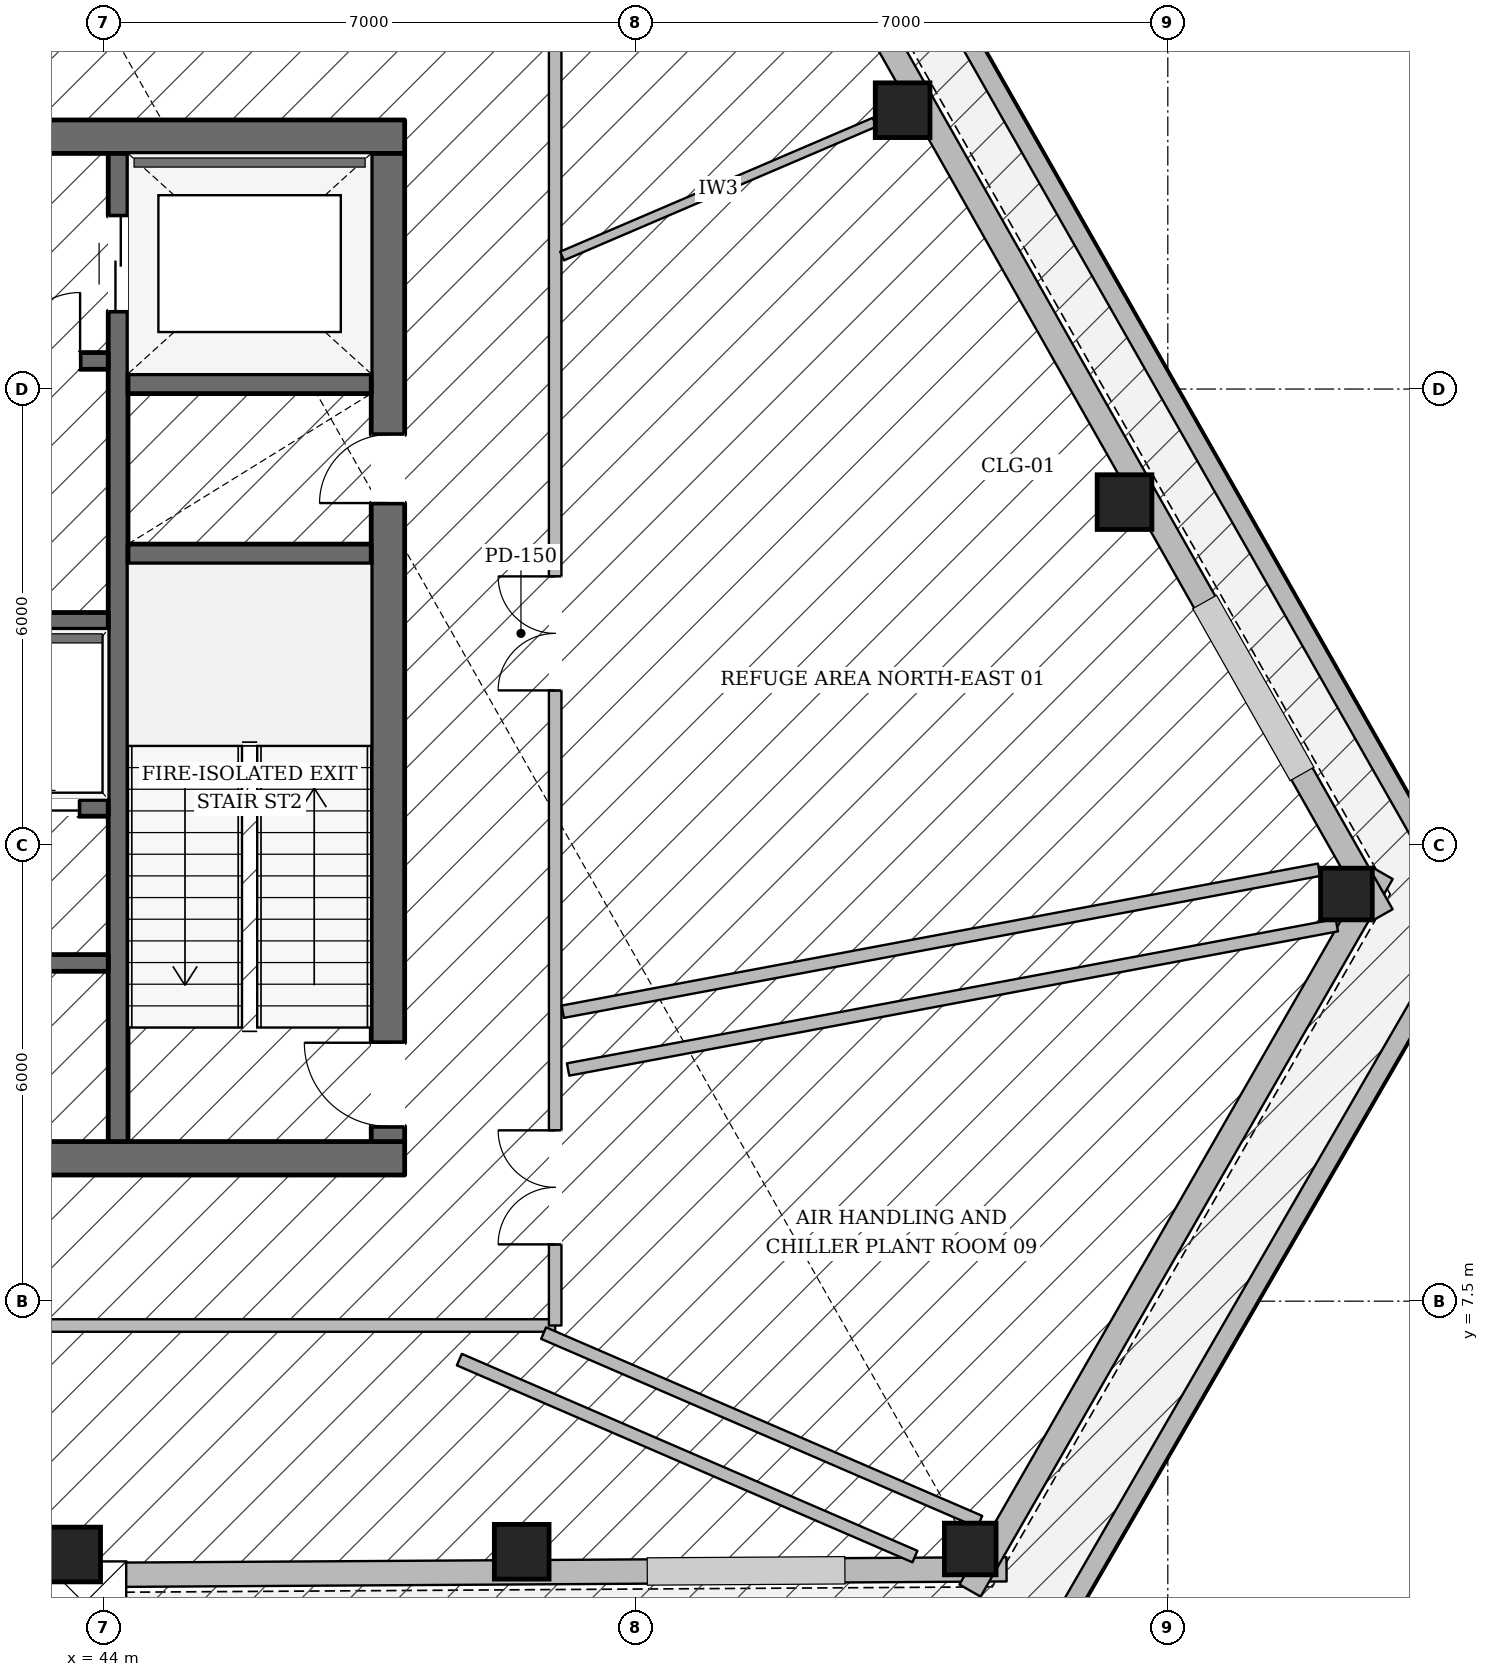
"""IFC4 building model, lengths in metres.
Left out: names, types, materials, properties, quantities, classifications, styles, units other than length and angle.
Written with IfcOpenShell. Run it as: python <this file> out.ifc"""

import sys

from ifc_helpers import new_model, si_unit, direction, frame, frame_2d, origin, origin_2d, place, context, subcontext, project, spatial, rectangle, hollow_rectangle, extrude, element, fill, save


model = new_model("IFC4")
c1 = context("Model", 3, precision=1e-05, world=origin(), true_north=direction((0.0, 1.0)))
c2 = subcontext(c1, "Body", "Model", "MODEL_VIEW")
j1 = project(units=[si_unit("LENGTHUNIT", "METRE"), si_unit("PLANEANGLEUNIT", "RADIAN")], contexts=[c1])
p1 = place(None, origin())
s1 = spatial("IfcSite", under=j1, at=p1, CompositionType="ELEMENT")
p2 = place(p1, origin())
s2 = spatial("IfcBuilding", under=s1, at=p2, CompositionType="ELEMENT")
p3 = place(p2, frame((0.0, 0.0, 154.8)))
s3 = spatial("IfcBuildingStorey", under=s2, at=p3, CompositionType="ELEMENT", Elevation=154.8)
p4 = place(p3, frame((28.04, 9.38, 0.0), z_axis=(0.0, 0.0, 1.0), x_axis=(1.0, 0.0, 0.0)))
e1 = element("IfcWall", 1, at=p4, inside=s3, PredefinedType="SOLIDWALL", context=c2, shape_type="SweptSolid", body=[
    extrude(rectangle(XDim=19.92, YDim=0.44, at=frame_2d((9.96, 0.0))), origin(), (0.0, 0.0, 1.0), 4.985),
])
p5 = place(p4, frame((10.46, 0.0, 0.0)))
e2 = element("IfcOpeningElement", 2, at=p5, cuts=e1, PredefinedType="OPENING", context=c2, shape_type="SweptSolid", body=[
    extrude(rectangle(XDim=1.4, YDim=2.2, at=frame_2d((0.7, 1.1))), frame((0.0, 0.23, 0.0), z_axis=(0.0, -1.0, 0.0), x_axis=(1.0, 0.0, 0.0)), (0.0, 0.0, 1.0), 0.46),
])
p6 = place(p3, frame((28.04, 22.82, 0.0), z_axis=(0.0, 0.0, 1.0), x_axis=(1.0, 0.0, 0.0)))
e3 = element("IfcWall", 3, at=p6, inside=s3, PredefinedType="SOLIDWALL", context=c2, shape_type="SweptSolid", body=[
    extrude(rectangle(XDim=19.92, YDim=0.44, at=frame_2d((9.96, 0.0))), origin(), (0.0, 0.0, 1.0), 4.985),
])
p7 = place(p6, frame((6.235, 0.0, 0.0)))
e4 = element("IfcOpeningElement", 4, at=p7, cuts=e3, PredefinedType="OPENING", context=c2, shape_type="SweptSolid", body=[
    extrude(rectangle(XDim=1.05, YDim=2.15, at=frame_2d((0.525, 1.075))), frame((0.0, 0.23, 0.0), z_axis=(0.0, -1.0, 0.0), x_axis=(1.0, 0.0, 0.0)), (0.0, 0.0, 1.0), 0.46),
])
p8 = place(p6, frame((12.635, 0.0, 0.0)))
e5 = element("IfcOpeningElement", 5, at=p8, cuts=e3, PredefinedType="OPENING", context=c2, shape_type="SweptSolid", body=[
    extrude(rectangle(XDim=1.05, YDim=2.15, at=frame_2d((0.525, 1.075))), frame((0.0, 0.23, 0.0), z_axis=(0.0, -1.0, 0.0), x_axis=(1.0, 0.0, 0.0)), (0.0, 0.0, 1.0), 0.46),
])
p9 = place(p3, frame((47.74, 9.6, 0.0), z_axis=(0.0, 0.0, 1.0), x_axis=(0.0, 1.0, 0.0)))
e6 = element("IfcWall", 6, at=p9, inside=s3, PredefinedType="SOLIDWALL", context=c2, shape_type="SweptSolid", body=[
    extrude(rectangle(XDim=13.0, YDim=0.44, at=frame_2d((6.5, 0.0))), origin(), (0.0, 0.0, 1.0), 4.985),
])
p10 = place(p9, frame((0.2, 0.0, 0.0)))
e7 = element("IfcOpeningElement", 7, at=p10, cuts=e6, PredefinedType="OPENING", context=c2, shape_type="SweptSolid", body=[
    extrude(rectangle(XDim=1.1, YDim=2.15, at=frame_2d((0.55, 1.075))), frame((0.0, 0.23, 0.0), z_axis=(0.0, -1.0, 0.0), x_axis=(1.0, 0.0, 0.0)), (0.0, 0.0, 1.0), 0.46),
])
p11 = place(p9, frame((8.4, 0.0, 0.0)))
e8 = element("IfcOpeningElement", 8, at=p11, cuts=e6, PredefinedType="OPENING", context=c2, shape_type="SweptSolid", body=[
    extrude(rectangle(XDim=0.9, YDim=2.1, at=frame_2d((0.45, 1.05))), frame((0.0, 0.23, 0.0), z_axis=(0.0, -1.0, 0.0), x_axis=(1.0, 0.0, 0.0)), (0.0, 0.0, 1.0), 0.46),
])
p12 = place(p3, frame((44.19, 9.6, 0.0), z_axis=(0.0, 0.0, 1.0), x_axis=(0.0, 1.0, 0.0)))
e9 = element("IfcWall", 9, at=p12, inside=s3, PredefinedType="SHEAR", context=c2, shape_type="SweptSolid", body=[
    extrude(rectangle(XDim=13.0, YDim=0.26, at=frame_2d((6.5, 0.0))), origin(), (0.0, 0.0, 1.0), 4.985),
])
p13 = place(p12, frame((10.925, 0.0, 0.0)))
e10 = element("IfcOpeningElement", 10, at=p13, cuts=e9, PredefinedType="OPENING", context=c2, shape_type="SweptSolid", body=[
    extrude(rectangle(XDim=1.25, YDim=2.25, at=frame_2d((0.625, 1.125))), frame((0.0, 0.14, 0.0), z_axis=(0.0, -1.0, 0.0), x_axis=(1.0, 0.0, 0.0)), (0.0, 0.0, 1.0), 0.28),
])
for number, where, z_axis, x_axis in (
    (11, (44.32, 17.33, 0.0), (0.0, 0.0, 1.0), (1.0, 0.0, 0.0)),
    (12, (44.32, 19.57, 0.0), (0.0, 0.0, 1.0), (1.0, 0.0, 0.0)),
):
    element("IfcWall", number, at=place(p3, frame(where, z_axis=z_axis, x_axis=x_axis)), inside=s3, PredefinedType="SHEAR", context=c2, shape_type="SweptSolid", body=[
        extrude(rectangle(XDim=3.2, YDim=0.26, at=frame_2d((1.6, 0.0))), origin(), (0.0, 0.0, 1.0), 4.985),
    ])
p14 = place(p3, frame((31.94, 19.87, 0.0), z_axis=(0.0, 0.0, 1.0), x_axis=(1.0, 0.0, 0.0)))
e13 = element("IfcWall", 13, at=p14, inside=s3, PredefinedType="SOLIDWALL", context=c2, shape_type="SweptSolid", body=[
    extrude(rectangle(XDim=12.12, YDim=0.22, at=frame_2d((6.06, 0.0))), origin(), (0.0, 0.0, 1.0), 4.985),
])
p15 = place(p14, frame((6.3, 0.0, 0.0)))
e14 = element("IfcOpeningElement", 14, at=p15, cuts=e13, PredefinedType="OPENING", context=c2, shape_type="SweptSolid", body=[
    extrude(rectangle(XDim=1.1, YDim=2.15, at=frame_2d((0.55, 1.075))), frame((0.0, 0.12, 0.0), z_axis=(0.0, -1.0, 0.0), x_axis=(1.0, 0.0, 0.0)), (0.0, 0.0, 1.0), 0.24),
])
p16 = place(p14, frame((8.61, 0.0, 0.0)))
e15 = element("IfcOpeningElement", 15, at=p16, cuts=e13, PredefinedType="OPENING", context=c2, shape_type="SweptSolid", body=[
    extrude(rectangle(XDim=0.9, YDim=2.1, at=frame_2d((0.45, 1.05))), frame((0.0, 0.12, 0.0), z_axis=(0.0, -1.0, 0.0), x_axis=(1.0, 0.0, 0.0)), (0.0, 0.0, 1.0), 0.24),
])
p17 = place(p14, frame((10.85, 0.0, 0.0)))
e16 = element("IfcOpeningElement", 16, at=p17, cuts=e13, PredefinedType="OPENING", context=c2, shape_type="SweptSolid", body=[
    extrude(rectangle(XDim=0.9, YDim=2.1, at=frame_2d((0.45, 1.05))), frame((0.0, 0.12, 0.0), z_axis=(0.0, -1.0, 0.0), x_axis=(1.0, 0.0, 0.0)), (0.0, 0.0, 1.0), 0.24),
])
p18 = place(p3, frame((31.94, 16.45, 0.0), z_axis=(0.0, 0.0, 1.0), x_axis=(1.0, 0.0, 0.0)))
e17 = element("IfcWall", 17, at=p18, inside=s3, PredefinedType="SOLIDWALL", context=c2, shape_type="SweptSolid", body=[
    extrude(rectangle(XDim=12.12, YDim=0.22, at=frame_2d((6.06, 0.0))), origin(), (0.0, 0.0, 1.0), 4.985),
])
p19 = place(p3, frame((31.94, 13.99, 0.0), z_axis=(0.0, 0.0, 1.0), x_axis=(1.0, 0.0, 0.0)))
e18 = element("IfcWall", 18, at=p19, inside=s3, PredefinedType="SOLIDWALL", context=c2, shape_type="SweptSolid", body=[
    extrude(rectangle(XDim=12.12, YDim=0.22, at=frame_2d((6.06, 0.0))), origin(), (0.0, 0.0, 1.0), 4.985),
])
p20 = place(p19, frame((1.21, 0.0, 0.0)))
e19 = element("IfcOpeningElement", 19, at=p20, cuts=e18, PredefinedType="OPENING", context=c2, shape_type="SweptSolid", body=[
    extrude(rectangle(XDim=0.9, YDim=2.1, at=frame_2d((0.45, 1.05))), frame((0.0, 0.12, 0.0), z_axis=(0.0, -1.0, 0.0), x_axis=(1.0, 0.0, 0.0)), (0.0, 0.0, 1.0), 0.24),
])
p21 = place(p19, frame((4.31, 0.0, 0.0)))
e20 = element("IfcOpeningElement", 20, at=p21, cuts=e18, PredefinedType="OPENING", context=c2, shape_type="SweptSolid", body=[
    extrude(rectangle(XDim=0.9, YDim=2.1, at=frame_2d((0.45, 1.05))), frame((0.0, 0.12, 0.0), z_axis=(0.0, -1.0, 0.0), x_axis=(1.0, 0.0, 0.0)), (0.0, 0.0, 1.0), 0.24),
])
p22 = place(p19, frame((6.535, 0.0, 0.0)))
e21 = element("IfcOpeningElement", 21, at=p22, cuts=e18, PredefinedType="OPENING", context=c2, shape_type="SweptSolid", body=[
    extrude(rectangle(XDim=1.1, YDim=2.2, at=frame_2d((0.55, 1.1))), frame((0.0, 0.12, 0.0), z_axis=(0.0, -1.0, 0.0), x_axis=(1.0, 0.0, 0.0)), (0.0, 0.0, 1.0), 0.24),
])
p23 = place(p19, frame((8.585, 0.0, 0.0)))
e22 = element("IfcOpeningElement", 22, at=p23, cuts=e18, PredefinedType="OPENING", context=c2, shape_type="SweptSolid", body=[
    extrude(rectangle(XDim=1.1, YDim=2.2, at=frame_2d((0.55, 1.1))), frame((0.0, 0.12, 0.0), z_axis=(0.0, -1.0, 0.0), x_axis=(1.0, 0.0, 0.0)), (0.0, 0.0, 1.0), 0.24),
])
p24 = place(p19, frame((10.635, 0.0, 0.0)))
e23 = element("IfcOpeningElement", 23, at=p24, cuts=e18, PredefinedType="OPENING", context=c2, shape_type="SweptSolid", body=[
    extrude(rectangle(XDim=1.1, YDim=2.2, at=frame_2d((0.55, 1.1))), frame((0.0, 0.12, 0.0), z_axis=(0.0, -1.0, 0.0), x_axis=(1.0, 0.0, 0.0)), (0.0, 0.0, 1.0), 0.24),
])
p25 = place(p3, frame((40.28, 11.95, 0.0), z_axis=(0.0, 0.0, 1.0), x_axis=(1.0, 0.0, 0.0)))
e24 = element("IfcWall", 24, at=p25, inside=s3, PredefinedType="SOLIDWALL", context=c2, shape_type="SweptSolid", body=[
    extrude(rectangle(XDim=3.78, YDim=0.22, at=frame_2d((1.89, 0.0))), origin(), (0.0, 0.0, 1.0), 4.985),
])
p26 = place(p25, frame((1.55, 0.0, 0.0)))
e25 = element("IfcOpeningElement", 25, at=p26, cuts=e24, PredefinedType="OPENING", context=c2, shape_type="SweptSolid", body=[
    extrude(rectangle(XDim=0.9, YDim=2.1, at=frame_2d((0.45, 1.05))), frame((0.0, 0.12, 0.0), z_axis=(0.0, -1.0, 0.0), x_axis=(1.0, 0.0, 0.0)), (0.0, 0.0, 1.0), 0.24),
])
for number, where, z_axis, x_axis in (
    (26, (43.599, 4.167, 0.0), (0.0, 0.0, 1.0), (1.0, 0.0, 0.0)),
    (27, (49.5, 4.204, 0.0), (0.0, 0.0, 1.0), (1.0, 0.0, 0.0)),
):
    element("IfcColumn", number, at=place(p3, frame(where, z_axis=z_axis, x_axis=x_axis)), inside=s3, PredefinedType="COLUMN", context=c2, shape_type="SweptSolid", body=[
        extrude(hollow_rectangle(XDim=0.72, YDim=0.72, WallThickness=0.032, at=origin_2d()), origin(), (0.0, 0.0, 1.0), 4.985),
    ])
for number, where, z_axis, x_axis in (
    (28, (55.401, 4.24, 0.0), (0.0, 0.0, 1.0), (1.0, 0.0, 0.0)),
    (29, (60.35, 12.857, 0.0), (0.0, 0.0, 1.0), (1.0, 0.0, 0.0)),
):
    element("IfcColumn", number, at=place(p3, frame(where, z_axis=z_axis, x_axis=x_axis)), inside=s3, PredefinedType="COLUMN", context=c2, shape_type="SweptSolid", body=[
        extrude(hollow_rectangle(XDim=0.68, YDim=0.68, WallThickness=0.03, at=origin_2d()), origin(), (0.0, 0.0, 1.0), 4.985),
    ])
for number, where, z_axis, x_axis in (
    (30, (57.431, 18.012, 0.0), (0.0, 0.0, 1.0), (1.0, 0.0, 0.0)),
    (31, (54.511, 23.168, 0.0), (0.0, 0.0, 1.0), (1.0, 0.0, 0.0)),
):
    element("IfcColumn", number, at=place(p3, frame(where, z_axis=z_axis, x_axis=x_axis)), inside=s3, PredefinedType="COLUMN", context=c2, shape_type="SweptSolid", body=[
        extrude(hollow_rectangle(XDim=0.72, YDim=0.72, WallThickness=0.032, at=origin_2d()), origin(), (0.0, 0.0, 1.0), 4.985),
    ])
p27 = place(p3, frame((55.878, 3.973, 0.0), z_axis=(0.0, 0.0, 1.0), x_axis=(-0.999981007106, -0.006163231827, 0.0)))
e32 = element("IfcWall", 32, at=p27, inside=s3, PredefinedType="STANDARD", context=c2, shape_type="SweptSolid", body=[
    extrude(rectangle(XDim=36.364, YDim=0.32, at=frame_2d((18.182, 0.0))), origin(), (0.0, 0.0, 1.0), 3.677),
])
p28 = place(p3, frame((60.82, 13.133, 0.0), z_axis=(0.0, 0.0, 1.0), x_axis=(-0.498074593496, -0.867134187605, 0.0)))
e33 = element("IfcWall", 33, at=p28, inside=s3, PredefinedType="STANDARD", context=c2, shape_type="SweptSolid", body=[
    extrude(rectangle(XDim=10.887, YDim=0.32, at=frame_2d((5.443, 0.0))), origin(), (0.0, 0.0, 1.0), 3.677),
])
p29 = place(p3, frame((42.832, 44.344, 0.0), z_axis=(0.0, 0.0, 1.0), x_axis=(0.492716907926, -0.870189662455, 0.0)))
e34 = element("IfcWall", 34, at=p29, inside=s3, PredefinedType="STANDARD", context=c2, shape_type="SweptSolid", body=[
    extrude(rectangle(XDim=36.505, YDim=0.32, at=frame_2d((18.253, 0.0))), origin(), (0.0, 0.0, 1.0), 3.677),
])
p30 = place(p3, frame((56.338, 2.824, 0.0), z_axis=(0.0, 0.0, 1.0), x_axis=(0.500909529634, 0.865499649406, 0.0)))
e35 = element("IfcWall", 35, at=p30, inside=s3, PredefinedType="PARAPET", context=c2, shape_type="SweptSolid", body=[
    extrude(rectangle(XDim=11.39, YDim=0.24, at=frame_2d((5.695, 0.0))), origin(), (0.0, 0.0, 1.0), 1.25),
])
p31 = place(p3, frame((62.043, 12.37, 0.0), z_axis=(0.0, 0.0, 1.0), x_axis=(-0.494365638539, 0.869254056897, 0.0)))
e36 = element("IfcWall", 36, at=p31, inside=s3, PredefinedType="PARAPET", context=c2, shape_type="SweptSolid", body=[
    extrude(rectangle(XDim=37.934, YDim=0.24, at=frame_2d((18.967, 0.0))), origin(), (0.0, 0.0, 1.0), 1.25),
])
p32 = place(p3, frame((26.06, 7.18, 0.0), z_axis=(0.0, 0.0, 1.0), x_axis=(1.0, 0.0, 0.0)))
e37 = element("IfcWall", 37, at=p32, inside=s3, PredefinedType="PARTITIONING", context=c2, shape_type="SweptSolid", body=[
    extrude(rectangle(XDim=23.88, YDim=0.165, at=frame_2d((11.94, 0.0))), origin(), (0.0, 0.0, 1.0), 2.825),
])
p33 = place(p32, frame((3.682, 0.0, 0.0)))
e38 = element("IfcOpeningElement", 38, at=p33, cuts=e37, PredefinedType="OPENING", context=c2, shape_type="SweptSolid", body=[
    extrude(rectangle(XDim=1.5, YDim=2.25, at=frame_2d((0.75, 1.125))), frame((0.0, 0.093, 0.0), z_axis=(0.0, -1.0, 0.0), x_axis=(1.0, 0.0, 0.0)), (0.0, 0.0, 1.0), 0.185),
])
p34 = place(p32, frame((13.829, 0.0, 0.0)))
e39 = element("IfcOpeningElement", 39, at=p34, cuts=e37, PredefinedType="OPENING", context=c2, shape_type="SweptSolid", body=[
    extrude(rectangle(XDim=1.5, YDim=2.25, at=frame_2d((0.75, 1.125))), frame((0.0, 0.093, 0.0), z_axis=(0.0, -1.0, 0.0), x_axis=(1.0, 0.0, 0.0)), (0.0, 0.0, 1.0), 0.185),
])
p35 = place(p3, frame((49.94, 7.18, 0.0), z_axis=(0.0, 0.0, 1.0), x_axis=(0.0, 1.0, 0.0)))
e40 = element("IfcWall", 40, at=p35, inside=s3, PredefinedType="PARTITIONING", context=c2, shape_type="SweptSolid", body=[
    extrude(rectangle(XDim=17.84, YDim=0.165, at=frame_2d((8.92, 0.0))), origin(), (0.0, 0.0, 1.0), 4.673),
])
p36 = place(p35, frame((8.355, 0.0, 0.0)))
e41 = element("IfcOpeningElement", 41, at=p36, cuts=e40, PredefinedType="OPENING", context=c2, shape_type="SweptSolid", body=[
    extrude(rectangle(XDim=1.5, YDim=2.25, at=frame_2d((0.75, 1.125))), frame((0.0, 0.093, 0.0), z_axis=(0.0, -1.0, 0.0), x_axis=(1.0, 0.0, 0.0)), (0.0, 0.0, 1.0), 0.185),
])
p37 = place(p35, frame((1.067, 0.0, 0.0)))
e42 = element("IfcOpeningElement", 42, at=p37, cuts=e40, PredefinedType="OPENING", context=c2, shape_type="SweptSolid", body=[
    extrude(rectangle(XDim=1.5, YDim=2.25, at=frame_2d((0.75, 1.125))), frame((0.0, 0.093, 0.0), z_axis=(0.0, -1.0, 0.0), x_axis=(1.0, 0.0, 0.0)), (0.0, 0.0, 1.0), 0.185),
])
p38 = place(p3, frame((49.788, 7.08, 0.0), z_axis=(0.0, 0.0, 1.0), x_axis=(0.917914325814, -0.396778641645, 0.0)))
e43 = element("IfcWall", 43, at=p38, inside=s3, PredefinedType="PARTITIONING", context=c2, shape_type="SweptSolid", body=[
    extrude(rectangle(XDim=6.251, YDim=0.165, at=frame_2d((3.125, 0.0))), origin(), (0.0, 0.0, 1.0), 4.985),
])
p39 = place(p3, frame((48.679, 6.731, 0.0), z_axis=(0.0, 0.0, 1.0), x_axis=(0.917920342818, -0.396764721518, 0.0)))
e44 = element("IfcWall", 44, at=p39, inside=s3, PredefinedType="PARTITIONING", context=c2, shape_type="SweptSolid", body=[
    extrude(rectangle(XDim=6.53, YDim=0.165, at=frame_2d((3.265, 0.0))), origin(), (0.0, 0.0, 1.0), 3.68),
])
p40 = place(p3, frame((50.04, 11.308, 0.0), z_axis=(0.0, 0.0, 1.0), x_axis=(0.98283531121, 0.184485097062, 0.0)))
e45 = element("IfcWall", 45, at=p40, inside=s3, PredefinedType="PARTITIONING", context=c2, shape_type="SweptSolid", body=[
    extrude(rectangle(XDim=10.124, YDim=0.165, at=frame_2d((5.062, 0.0))), origin(), (0.0, 0.0, 1.0), 4.985),
])
p41 = place(p3, frame((50.11, 10.548, 0.0), z_axis=(0.0, 0.0, 1.0), x_axis=(0.982839403787, 0.184463292725, 0.0)))
e46 = element("IfcWall", 46, at=p41, inside=s3, PredefinedType="PARTITIONING", context=c2, shape_type="SweptSolid", body=[
    extrude(rectangle(XDim=10.29, YDim=0.165, at=frame_2d((5.145, 0.0))), origin(), (0.0, 0.0, 1.0), 4.673),
])
p42 = place(p3, frame((50.031, 21.25, 0.0), z_axis=(0.0, 0.0, 1.0), x_axis=(0.919317125759, 0.393517499338, 0.0)))
e47 = element("IfcWall", 47, at=p42, inside=s3, PredefinedType="PARTITIONING", context=c2, shape_type="SweptSolid", body=[
    extrude(rectangle(XDim=4.474, YDim=0.125, at=frame_2d((2.237, 0.0))), origin(), (0.0, 0.0, 1.0), 3.68),
])
p43 = place(p3, frame((0.0, 0.0, -0.22)))
p44 = place(p43, frame((43.747, 3.527, 0.0)))
p45 = place(p44, frame((0.0, 0.0, 0.17)))
e48 = element("IfcWindow", 48, at=p45, inside=s3, PartitioningType="SINGLE_PANEL", PredefinedType="SKYLIGHT", context=c2, shape_type="SweptSolid", body=[
    extrude(rectangle(XDim=1.1, YDim=1.1, at=origin_2d()), origin(), (0.0, 0.0, 1.0), 0.05),
])
p46 = place(p10, origin())
e49 = element("IfcDoor", 49, at=p46, inside=s3, OperationType="SINGLE_SWING_RIGHT", PredefinedType="DOOR", context=c2, shape_type="SweptSolid", body=[
    extrude(rectangle(XDim=1.1, YDim=2.15, at=frame_2d((0.55, 1.075))), frame((0.0, 0.025, 0.0), z_axis=(0.0, -1.0, 0.0), x_axis=(1.0, 0.0, 0.0)), (0.0, 0.0, 1.0), 0.05),
])
fill(e7, e49)
p47 = place(p11, origin())
e50 = element("IfcDoor", 50, at=p47, inside=s3, OperationType="SINGLE_SWING_LEFT", PredefinedType="DOOR", context=c2, shape_type="SweptSolid", body=[
    extrude(rectangle(XDim=0.9, YDim=2.1, at=frame_2d((0.45, 1.05))), frame((0.0, 0.025, 0.0), z_axis=(0.0, -1.0, 0.0), x_axis=(1.0, 0.0, 0.0)), (0.0, 0.0, 1.0), 0.05),
])
fill(e8, e50)
p48 = place(p13, origin())
e51 = element("IfcDoor", 51, at=p48, inside=s3, OperationType="DOUBLE_DOOR_SLIDING", PredefinedType="DOOR", context=c2, shape_type="SweptSolid", body=[
    extrude(rectangle(XDim=1.25, YDim=2.25, at=frame_2d((0.625, 1.125))), frame((0.0, 0.025, 0.0), z_axis=(0.0, -1.0, 0.0), x_axis=(1.0, 0.0, 0.0)), (0.0, 0.0, 1.0), 0.05),
])
fill(e10, e51)
p49 = place(p24, origin())
e52 = element("IfcDoor", 52, at=p49, inside=s3, OperationType="DOUBLE_DOOR_SLIDING", PredefinedType="DOOR", context=c2, shape_type="SweptSolid", body=[
    extrude(rectangle(XDim=1.1, YDim=2.2, at=frame_2d((0.55, 1.1))), frame((0.0, 0.025, 0.0), z_axis=(0.0, -1.0, 0.0), x_axis=(1.0, 0.0, 0.0)), (0.0, 0.0, 1.0), 0.05),
])
fill(e23, e52)
p50 = place(p17, origin())
e53 = element("IfcDoor", 53, at=p50, inside=s3, OperationType="SINGLE_SWING_RIGHT", PredefinedType="DOOR", context=c2, shape_type="SweptSolid", body=[
    extrude(rectangle(XDim=0.9, YDim=2.1, at=frame_2d((0.45, 1.05))), frame((0.0, 0.025, 0.0), z_axis=(0.0, -1.0, 0.0), x_axis=(1.0, 0.0, 0.0)), (0.0, 0.0, 1.0), 0.05),
])
fill(e16, e53)
p51 = place(p36, origin())
e54 = element("IfcDoor", 54, at=p51, inside=s3, OperationType="DOUBLE_DOOR_SINGLE_SWING", PredefinedType="DOOR", context=c2, shape_type="SweptSolid", body=[
    extrude(rectangle(XDim=1.5, YDim=2.25, at=frame_2d((0.75, 1.125))), frame((0.0, 0.025, 0.0), z_axis=(0.0, -1.0, 0.0), x_axis=(1.0, 0.0, 0.0)), (0.0, 0.0, 1.0), 0.05),
])
fill(e41, e54)
p52 = place(p37, origin())
e55 = element("IfcDoor", 55, at=p52, inside=s3, OperationType="DOUBLE_DOOR_SINGLE_SWING", PredefinedType="DOOR", context=c2, shape_type="SweptSolid", body=[
    extrude(rectangle(XDim=1.5, YDim=2.25, at=frame_2d((0.75, 1.125))), frame((0.0, 0.025, 0.0), z_axis=(0.0, -1.0, 0.0), x_axis=(1.0, 0.0, 0.0)), (0.0, 0.0, 1.0), 0.05),
])
fill(e42, e55)
save(model, sys.argv[1])
